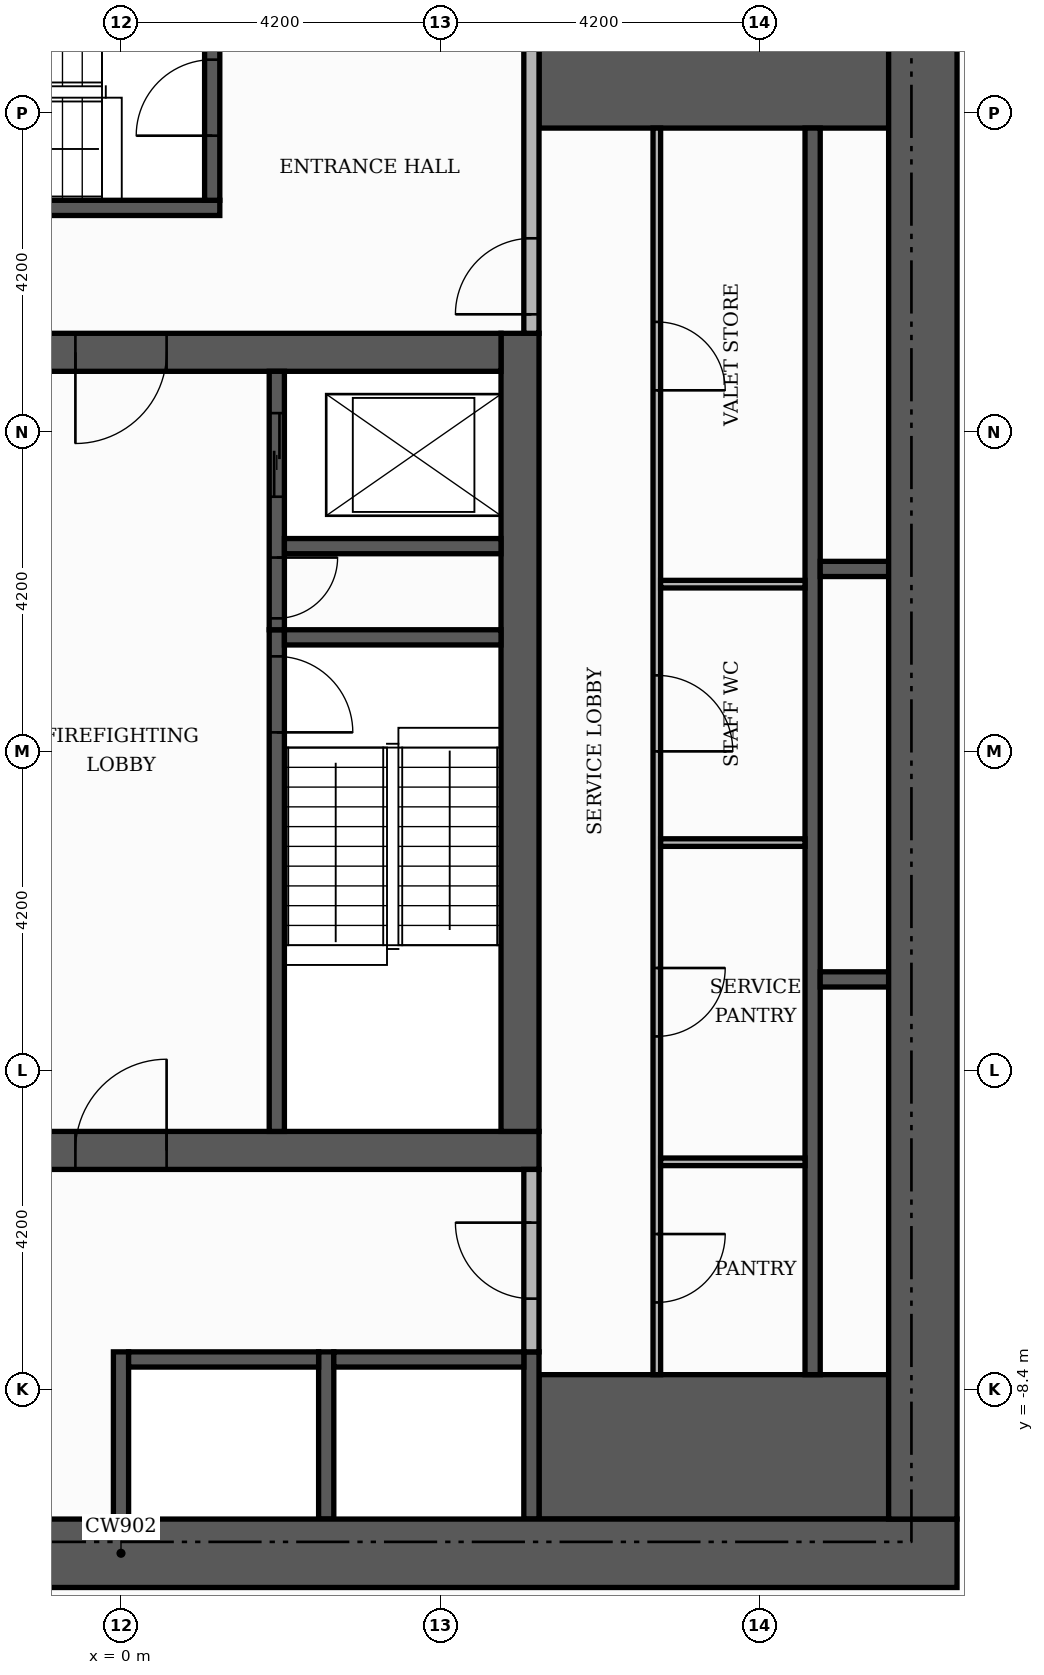
"""IFC4 building model, lengths in metres.
Left out: names, types, materials, properties, quantities, classifications, styles, units other than length and angle.
Written with IfcOpenShell. Run it as: python <this file> out.ifc"""

import sys

from ifc_helpers import new_model, si_unit, direction, frame, frame_2d, origin, place, context, subcontext, project, spatial, rectangle, extrude, element, fill, save


model = new_model("IFC4")
c1 = context("Model", 3, precision=1e-05, world=origin(), true_north=direction((0.0, 1.0)))
c2 = subcontext(c1, "Body", "Model", "MODEL_VIEW")
j1 = project(units=[si_unit("LENGTHUNIT", "METRE"), si_unit("PLANEANGLEUNIT", "RADIAN")], contexts=[c1])
p1 = place(None, origin())
s1 = spatial("IfcSite", under=j1, at=p1, CompositionType="ELEMENT")
p2 = place(p1, origin())
s2 = spatial("IfcBuilding", under=s1, at=p2, CompositionType="ELEMENT")
p3 = place(p2, frame((0.0, 0.0, 98.7)))
s3 = spatial("IfcBuildingStorey", under=s2, at=p3, CompositionType="ELEMENT", Elevation=98.7)
p4 = place(p3, frame((-5.5, -5.25, 0.0), z_axis=(0.0, 0.0, 1.0), x_axis=(1.0, 0.0, 0.0)))
e1 = element("IfcWall", 1, at=p4, inside=s3, PredefinedType="SHEAR", context=c2, shape_type="SweptSolid", body=[
    extrude(rectangle(XDim=11.0, YDim=0.5, at=frame_2d((5.5, 0.0))), origin(), (0.0, 0.0, 1.0), 3.48),
])
p5 = place(p4, frame((4.9, 0.0, 0.0)))
e2 = element("IfcOpeningElement", 2, at=p5, cuts=e1, PredefinedType="OPENING", context=c2, shape_type="SweptSolid", body=[
    extrude(rectangle(XDim=1.2, YDim=2.1, at=frame_2d((0.6, 1.05))), frame((0.0, 0.26, 0.0), z_axis=(0.0, -1.0, 0.0), x_axis=(1.0, 0.0, 0.0)), (0.0, 0.0, 1.0), 0.52),
])
p6 = place(p3, frame((5.25, -5.0, 0.0), z_axis=(0.0, 0.0, 1.0), x_axis=(0.0, 1.0, 0.0)))
e3 = element("IfcWall", 3, at=p6, inside=s3, PredefinedType="SHEAR", context=c2, shape_type="SweptSolid", body=[
    extrude(rectangle(XDim=10.5, YDim=0.5, at=frame_2d((5.25, 0.0))), origin(), (0.0, 0.0, 1.0), 3.48),
])
p7 = place(p3, frame((-5.0, 5.25, 0.0), z_axis=(0.0, 0.0, 1.0), x_axis=(1.0, 0.0, 0.0)))
e4 = element("IfcWall", 4, at=p7, inside=s3, PredefinedType="SHEAR", context=c2, shape_type="SweptSolid", body=[
    extrude(rectangle(XDim=10.0, YDim=0.5, at=frame_2d((5.0, 0.0))), origin(), (0.0, 0.0, 1.0), 3.48),
])
p8 = place(p7, frame((4.4, 0.0, 0.0)))
e5 = element("IfcOpeningElement", 5, at=p8, cuts=e4, PredefinedType="OPENING", context=c2, shape_type="SweptSolid", body=[
    extrude(rectangle(XDim=1.2, YDim=2.1, at=frame_2d((0.6, 1.05))), frame((0.0, 0.26, 0.0), z_axis=(0.0, -1.0, 0.0), x_axis=(1.0, 0.0, 0.0)), (0.0, 0.0, 1.0), 0.52),
])
for number, where, z_axis, x_axis in (
    (6, (5.5, -9.15, 0.0), (0.0, 0.0, 1.0), (1.0, 0.0, 0.0)),
    (7, (5.5, 9.15, 0.0), (0.0, 0.0, 1.0), (1.0, 0.0, 0.0)),
):
    element("IfcWall", number, at=place(p3, frame(where, z_axis=z_axis, x_axis=x_axis)), inside=s3, PredefinedType="SHEAR", context=c2, shape_type="SweptSolid", body=[
        extrude(rectangle(XDim=4.6, YDim=1.9, at=frame_2d((2.3, 0.0))), origin(), (0.0, 0.0, 1.0), 3.48),
    ])
p9 = place(p3, frame((2.05, -5.0, 0.0), z_axis=(0.0, 0.0, 1.0), x_axis=(0.0, 1.0, 0.0)))
e8 = element("IfcWall", 8, at=p9, inside=s3, PredefinedType="SHEAR", context=c2, shape_type="SweptSolid", body=[
    extrude(rectangle(XDim=6.6, YDim=0.2, at=frame_2d((3.3, 0.0))), origin(), (0.0, 0.0, 1.0), 3.48),
])
p10 = place(p9, frame((5.25, 0.0, 0.0)))
e9 = element("IfcOpeningElement", 9, at=p10, cuts=e8, PredefinedType="OPENING", context=c2, shape_type="SweptSolid", body=[
    extrude(rectangle(XDim=1.0, YDim=2.1, at=frame_2d((0.5, 1.05))), frame((0.0, 0.11, 0.0), z_axis=(0.0, -1.0, 0.0), x_axis=(1.0, 0.0, 0.0)), (0.0, 0.0, 1.0), 0.22),
])
p11 = place(p3, frame((2.15, 1.5, 0.0), z_axis=(0.0, 0.0, 1.0), x_axis=(1.0, 0.0, 0.0)))
e10 = element("IfcWall", 10, at=p11, inside=s3, PredefinedType="SHEAR", context=c2, shape_type="SweptSolid", body=[
    extrude(rectangle(XDim=2.85, YDim=0.2, at=frame_2d((1.425, 0.0))), origin(), (0.0, 0.0, 1.0), 3.48),
])
p12 = place(p3, frame((-5.5, 7.15, 0.0), z_axis=(0.0, 0.0, 1.0), x_axis=(1.0, 0.0, 0.0)))
e11 = element("IfcWall", 11, at=p12, inside=s3, PredefinedType="SHEAR", context=c2, shape_type="SweptSolid", body=[
    extrude(rectangle(XDim=6.8, YDim=0.2, at=frame_2d((3.4, 0.0))), origin(), (0.0, 0.0, 1.0), 3.48),
])
p13 = place(p3, frame((1.2, 7.25, 0.0), z_axis=(0.0, 0.0, 1.0), x_axis=(0.0, 1.0, 0.0)))
e12 = element("IfcWall", 12, at=p13, inside=s3, PredefinedType="SHEAR", context=c2, shape_type="SweptSolid", body=[
    extrude(rectangle(XDim=2.85, YDim=0.2, at=frame_2d((1.425, 0.0))), origin(), (0.0, 0.0, 1.0), 3.48),
])
p14 = place(p13, frame((0.85, 0.0, 0.0)))
e13 = element("IfcOpeningElement", 13, at=p14, cuts=e12, PredefinedType="OPENING", context=c2, shape_type="SweptSolid", body=[
    extrude(rectangle(XDim=1.0, YDim=2.1, at=frame_2d((0.5, 1.05))), frame((0.0, 0.11, 0.0), z_axis=(0.0, -1.0, 0.0), x_axis=(1.0, 0.0, 0.0)), (0.0, 0.0, 1.0), 0.22),
])
for number, where, z_axis, x_axis in (
    (14, (0.0, -10.1, 0.0), (0.0, 0.0, 1.0), (0.0, 1.0, 0.0)),
    (15, (2.7, -10.1, 0.0), (0.0, 0.0, 1.0), (0.0, 1.0, 0.0)),
    (16, (5.4, -10.1, 0.0), (0.0, 0.0, 1.0), (0.0, 1.0, 0.0)),
):
    element("IfcWall", number, at=place(p3, frame(where, z_axis=z_axis, x_axis=x_axis)), inside=s3, PredefinedType="SHEAR", context=c2, shape_type="SweptSolid", body=[
        extrude(rectangle(XDim=2.2, YDim=0.2, at=frame_2d((1.1, 0.0))), origin(), (0.0, 0.0, 1.0), 3.48),
    ])
p15 = place(p3, frame((9.1, -8.2, 0.0), z_axis=(0.0, 0.0, 1.0), x_axis=(0.0, 1.0, 0.0)))
e17 = element("IfcWall", 17, at=p15, inside=s3, PredefinedType="SHEAR", context=c2, shape_type="SweptSolid", body=[
    extrude(rectangle(XDim=16.4, YDim=0.2, at=frame_2d((8.2, 0.0))), origin(), (0.0, 0.0, 1.0), 3.48),
])
for number, where, z_axis, x_axis in (
    (18, (0.1, -8.0, 0.0), (0.0, 0.0, 1.0), (1.0, 0.0, 0.0)),
    (19, (2.8, -8.0, 0.0), (0.0, 0.0, 1.0), (1.0, 0.0, 0.0)),
):
    element("IfcWall", number, at=place(p3, frame(where, z_axis=z_axis, x_axis=x_axis)), inside=s3, PredefinedType="SHEAR", context=c2, shape_type="SweptSolid", body=[
        extrude(rectangle(XDim=2.5, YDim=0.2, at=frame_2d((1.25, 0.0))), origin(), (0.0, 0.0, 1.0), 3.48),
    ])
p16 = place(p3, frame((9.2, -3.0, 0.0), z_axis=(0.0, 0.0, 1.0), x_axis=(1.0, 0.0, 0.0)))
e20 = element("IfcWall", 20, at=p16, inside=s3, PredefinedType="SHEAR", context=c2, shape_type="SweptSolid", body=[
    extrude(rectangle(XDim=0.9, YDim=0.2, at=frame_2d((0.45, 0.0))), origin(), (0.0, 0.0, 1.0), 3.48),
])
p17 = place(p3, frame((2.05, 1.6, 0.0), z_axis=(0.0, 0.0, 1.0), x_axis=(0.0, 1.0, 0.0)))
e21 = element("IfcWall", 21, at=p17, inside=s3, PredefinedType="SHEAR", context=c2, shape_type="SweptSolid", body=[
    extrude(rectangle(XDim=3.4, YDim=0.2, at=frame_2d((1.7, 0.0))), origin(), (0.0, 0.0, 1.0), 3.48),
])
p18 = place(p17, frame((1.75, 0.0, 0.0)))
e22 = element("IfcOpeningElement", 22, at=p18, cuts=e21, PredefinedType="OPENING", context=c2, shape_type="SweptSolid", body=[
    extrude(rectangle(XDim=1.1, YDim=2.1, at=frame_2d((0.55, 1.05))), frame((0.0, 0.11, 0.0), z_axis=(0.0, -1.0, 0.0), x_axis=(1.0, 0.0, 0.0)), (0.0, 0.0, 1.0), 0.22),
])
p19 = place(p17, frame((0.15, 0.0, 0.0)))
e23 = element("IfcOpeningElement", 23, at=p19, cuts=e21, PredefinedType="OPENING", context=c2, shape_type="SweptSolid", body=[
    extrude(rectangle(XDim=0.8, YDim=2.1, at=frame_2d((0.4, 1.05))), frame((0.0, 0.11, 0.0), z_axis=(0.0, -1.0, 0.0), x_axis=(1.0, 0.0, 0.0)), (0.0, 0.0, 1.0), 0.22),
])
p20 = place(p3, frame((9.2, 2.4, 0.0), z_axis=(0.0, 0.0, 1.0), x_axis=(1.0, 0.0, 0.0)))
e24 = element("IfcWall", 24, at=p20, inside=s3, PredefinedType="SHEAR", context=c2, shape_type="SweptSolid", body=[
    extrude(rectangle(XDim=0.9, YDim=0.2, at=frame_2d((0.45, 0.0))), origin(), (0.0, 0.0, 1.0), 3.48),
])
p21 = place(p3, frame((2.15, 2.7, 0.0), z_axis=(0.0, 0.0, 1.0), x_axis=(1.0, 0.0, 0.0)))
e25 = element("IfcWall", 25, at=p21, inside=s3, PredefinedType="SHEAR", context=c2, shape_type="SweptSolid", body=[
    extrude(rectangle(XDim=2.85, YDim=0.2, at=frame_2d((1.425, 0.0))), origin(), (0.0, 0.0, 1.0), 3.48),
])
p22 = place(p3, frame((-11.0, -10.55, 0.0), z_axis=(0.0, 0.0, 1.0), x_axis=(1.0, 0.0, 0.0)))
e26 = element("IfcWall", 26, at=p22, inside=s3, PredefinedType="SHEAR", context=c2, shape_type="SweptSolid", body=[
    extrude(rectangle(XDim=22.0, YDim=0.9, at=frame_2d((11.0, 0.0))), origin(), (0.0, 0.0, 1.0), 3.48),
])
p23 = place(p22, frame((7.4, 0.0, 0.0)))
e27 = element("IfcOpeningElement", 27, at=p23, cuts=e26, PredefinedType="OPENING", context=c2, shape_type="SweptSolid", body=[
    extrude(rectangle(XDim=1.8, YDim=2.2, at=frame_2d((0.9, 1.1))), frame((0.0, 0.46, 0.0), z_axis=(0.0, -1.0, 0.0), x_axis=(1.0, 0.0, 0.0)), (0.0, 0.0, 1.0), 0.92),
])
p24 = place(p3, frame((10.55, -10.1, 0.0), z_axis=(0.0, 0.0, 1.0), x_axis=(0.0, 1.0, 0.0)))
e28 = element("IfcWall", 28, at=p24, inside=s3, PredefinedType="SHEAR", context=c2, shape_type="SweptSolid", body=[
    extrude(rectangle(XDim=20.2, YDim=0.9, at=frame_2d((10.1, 0.0))), origin(), (0.0, 0.0, 1.0), 3.48),
])
p25 = place(p3, frame((7.05, -8.2, 0.0), z_axis=(0.0, 0.0, 1.0), x_axis=(0.0, 1.0, 0.0)))
e29 = element("IfcWall", 29, at=p25, inside=s3, PredefinedType="PARTITIONING", context=c2, shape_type="SweptSolid", body=[
    extrude(rectangle(XDim=16.4, YDim=0.1, at=frame_2d((8.2, 0.0))), origin(), (0.0, 0.0, 1.0), 3.48),
])
p26 = place(p25, frame((0.95, 0.0, 0.0)))
e30 = element("IfcOpeningElement", 30, at=p26, cuts=e29, PredefinedType="OPENING", context=c2, shape_type="SweptSolid", body=[
    extrude(rectangle(XDim=0.9, YDim=2.1, at=frame_2d((0.45, 1.05))), frame((0.0, 0.06, 0.0), z_axis=(0.0, -1.0, 0.0), x_axis=(1.0, 0.0, 0.0)), (0.0, 0.0, 1.0), 0.12),
])
p27 = place(p25, frame((4.45, 0.0, 0.0)))
e31 = element("IfcOpeningElement", 31, at=p27, cuts=e29, PredefinedType="OPENING", context=c2, shape_type="SweptSolid", body=[
    extrude(rectangle(XDim=0.9, YDim=2.1, at=frame_2d((0.45, 1.05))), frame((0.0, 0.06, 0.0), z_axis=(0.0, -1.0, 0.0), x_axis=(1.0, 0.0, 0.0)), (0.0, 0.0, 1.0), 0.12),
])
p28 = place(p25, frame((8.2, 0.0, 0.0)))
e32 = element("IfcOpeningElement", 32, at=p28, cuts=e29, PredefinedType="OPENING", context=c2, shape_type="SweptSolid", body=[
    extrude(rectangle(XDim=1.0, YDim=2.1, at=frame_2d((0.5, 1.05))), frame((0.0, 0.06, 0.0), z_axis=(0.0, -1.0, 0.0), x_axis=(1.0, 0.0, 0.0)), (0.0, 0.0, 1.0), 0.12),
])
p29 = place(p25, frame((12.95, 0.0, 0.0)))
e33 = element("IfcOpeningElement", 33, at=p29, cuts=e29, PredefinedType="OPENING", context=c2, shape_type="SweptSolid", body=[
    extrude(rectangle(XDim=0.9, YDim=2.1, at=frame_2d((0.45, 1.05))), frame((0.0, 0.06, 0.0), z_axis=(0.0, -1.0, 0.0), x_axis=(1.0, 0.0, 0.0)), (0.0, 0.0, 1.0), 0.12),
])
p30 = place(p3, frame((5.4, -7.9, 0.0), z_axis=(0.0, 0.0, 1.0), x_axis=(0.0, 1.0, 0.0)))
e34 = element("IfcWall", 34, at=p30, inside=s3, PredefinedType="PARTITIONING", context=c2, shape_type="SweptSolid", body=[
    extrude(rectangle(XDim=2.4, YDim=0.2, at=frame_2d((1.2, 0.0))), origin(), (0.0, 0.0, 1.0), 3.48),
])
p31 = place(p30, frame((0.7, 0.0, 0.0)))
e35 = element("IfcOpeningElement", 35, at=p31, cuts=e34, PredefinedType="OPENING", context=c2, shape_type="SweptSolid", body=[
    extrude(rectangle(XDim=1.0, YDim=2.1, at=frame_2d((0.5, 1.05))), frame((0.0, 0.11, 0.0), z_axis=(0.0, -1.0, 0.0), x_axis=(1.0, 0.0, 0.0)), (0.0, 0.0, 1.0), 0.22),
])
for number, where, z_axis, x_axis in (
    (36, (7.1, -5.4, 0.0), (0.0, 0.0, 1.0), (1.0, 0.0, 0.0)),
    (37, (7.1, -1.2, 0.0), (0.0, 0.0, 1.0), (1.0, 0.0, 0.0)),
    (38, (7.1, 2.2, 0.0), (0.0, 0.0, 1.0), (1.0, 0.0, 0.0)),
):
    element("IfcWall", number, at=place(p3, frame(where, z_axis=z_axis, x_axis=x_axis)), inside=s3, PredefinedType="PARTITIONING", context=c2, shape_type="SweptSolid", body=[
        extrude(rectangle(XDim=1.9, YDim=0.1, at=frame_2d((0.95, 0.0))), origin(), (0.0, 0.0, 1.0), 3.48),
    ])
p32 = place(p3, frame((5.4, 5.5, 0.0), z_axis=(0.0, 0.0, 1.0), x_axis=(0.0, 1.0, 0.0)))
e39 = element("IfcWall", 39, at=p32, inside=s3, PredefinedType="PARTITIONING", context=c2, shape_type="SweptSolid", body=[
    extrude(rectangle(XDim=4.6, YDim=0.2, at=frame_2d((2.3, 0.0))), origin(), (0.0, 0.0, 1.0), 3.48),
])
p33 = place(p32, frame((0.25, 0.0, 0.0)))
e40 = element("IfcOpeningElement", 40, at=p33, cuts=e39, PredefinedType="OPENING", context=c2, shape_type="SweptSolid", body=[
    extrude(rectangle(XDim=1.0, YDim=2.1, at=frame_2d((0.5, 1.05))), frame((0.0, 0.11, 0.0), z_axis=(0.0, -1.0, 0.0), x_axis=(1.0, 0.0, 0.0)), (0.0, 0.0, 1.0), 0.22),
])
p34 = place(p18, origin())
e41 = element("IfcDoor", 41, at=p34, inside=s3, OperationType="SLIDING_TO_LEFT", PredefinedType="DOOR", context=c2, shape_type="SweptSolid", body=[
    extrude(rectangle(XDim=1.1, YDim=2.1, at=frame_2d((0.55, 1.05))), frame((0.0, 0.025, 0.0), z_axis=(0.0, -1.0, 0.0), x_axis=(1.0, 0.0, 0.0)), (0.0, 0.0, 1.0), 0.05),
])
fill(e22, e41)
p35 = place(p10, frame((1.0, 0.0, 0.0), z_axis=(0.0, 0.0, 1.0), x_axis=(-1.0, 0.0, 0.0)))
e42 = element("IfcDoor", 42, at=p35, inside=s3, OperationType="SINGLE_SWING_LEFT", PredefinedType="DOOR", context=c2, shape_type="SweptSolid", body=[
    extrude(rectangle(XDim=1.0, YDim=2.1, at=frame_2d((0.5, 1.05))), frame((0.0, 0.025, 0.0), z_axis=(0.0, -1.0, 0.0), x_axis=(1.0, 0.0, 0.0)), (0.0, 0.0, 1.0), 0.05),
])
fill(e9, e42)
p36 = place(p19, frame((0.8, 0.0, 0.0), z_axis=(0.0, 0.0, 1.0), x_axis=(-1.0, 0.0, 0.0)))
e43 = element("IfcDoor", 43, at=p36, inside=s3, OperationType="SINGLE_SWING_RIGHT", PredefinedType="DOOR", context=c2, shape_type="SweptSolid", body=[
    extrude(rectangle(XDim=0.8, YDim=2.1, at=frame_2d((0.4, 1.05))), frame((0.0, 0.025, 0.0), z_axis=(0.0, -1.0, 0.0), x_axis=(1.0, 0.0, 0.0)), (0.0, 0.0, 1.0), 0.05),
])
fill(e23, e43)
p37 = place(p8, frame((1.2, 0.0, 0.0), z_axis=(0.0, 0.0, 1.0), x_axis=(-1.0, 0.0, 0.0)))
e44 = element("IfcDoor", 44, at=p37, inside=s3, OperationType="SINGLE_SWING_LEFT", PredefinedType="DOOR", context=c2, shape_type="SweptSolid", body=[
    extrude(rectangle(XDim=1.2, YDim=2.1, at=frame_2d((0.6, 1.05))), frame((0.0, 0.025, 0.0), z_axis=(0.0, -1.0, 0.0), x_axis=(1.0, 0.0, 0.0)), (0.0, 0.0, 1.0), 0.05),
])
fill(e5, e44)
p38 = place(p5, origin())
e45 = element("IfcDoor", 45, at=p38, inside=s3, OperationType="SINGLE_SWING_RIGHT", PredefinedType="DOOR", context=c2, shape_type="SweptSolid", body=[
    extrude(rectangle(XDim=1.2, YDim=2.1, at=frame_2d((0.6, 1.05))), frame((0.0, 0.025, 0.0), z_axis=(0.0, -1.0, 0.0), x_axis=(1.0, 0.0, 0.0)), (0.0, 0.0, 1.0), 0.05),
])
fill(e2, e45)
p39 = place(p14, origin())
e46 = element("IfcDoor", 46, at=p39, inside=s3, OperationType="SINGLE_SWING_LEFT", PredefinedType="DOOR", context=c2, shape_type="SweptSolid", body=[
    extrude(rectangle(XDim=1.0, YDim=2.1, at=frame_2d((0.5, 1.05))), frame((0.0, 0.025, 0.0), z_axis=(0.0, -1.0, 0.0), x_axis=(1.0, 0.0, 0.0)), (0.0, 0.0, 1.0), 0.05),
])
fill(e13, e46)
p40 = place(p33, origin())
e47 = element("IfcDoor", 47, at=p40, inside=s3, OperationType="SINGLE_SWING_LEFT", PredefinedType="DOOR", context=c2, shape_type="SweptSolid", body=[
    extrude(rectangle(XDim=1.0, YDim=2.1, at=frame_2d((0.5, 1.05))), frame((0.0, 0.025, 0.0), z_axis=(0.0, -1.0, 0.0), x_axis=(1.0, 0.0, 0.0)), (0.0, 0.0, 1.0), 0.05),
])
fill(e40, e47)
p41 = place(p31, origin())
e48 = element("IfcDoor", 48, at=p41, inside=s3, OperationType="SINGLE_SWING_RIGHT", PredefinedType="DOOR", context=c2, shape_type="SweptSolid", body=[
    extrude(rectangle(XDim=1.0, YDim=2.1, at=frame_2d((0.5, 1.05))), frame((0.0, 0.025, 0.0), z_axis=(0.0, -1.0, 0.0), x_axis=(1.0, 0.0, 0.0)), (0.0, 0.0, 1.0), 0.05),
])
fill(e35, e48)
p42 = place(p26, frame((0.9, 0.0, 0.0), z_axis=(0.0, 0.0, 1.0), x_axis=(-1.0, 0.0, 0.0)))
e49 = element("IfcDoor", 49, at=p42, inside=s3, OperationType="SINGLE_SWING_RIGHT", PredefinedType="DOOR", context=c2, shape_type="SweptSolid", body=[
    extrude(rectangle(XDim=0.9, YDim=2.1, at=frame_2d((0.45, 1.05))), frame((0.0, 0.025, 0.0), z_axis=(0.0, -1.0, 0.0), x_axis=(1.0, 0.0, 0.0)), (0.0, 0.0, 1.0), 0.05),
])
fill(e30, e49)
p43 = place(p27, frame((0.9, 0.0, 0.0), z_axis=(0.0, 0.0, 1.0), x_axis=(-1.0, 0.0, 0.0)))
e50 = element("IfcDoor", 50, at=p43, inside=s3, OperationType="SINGLE_SWING_RIGHT", PredefinedType="DOOR", context=c2, shape_type="SweptSolid", body=[
    extrude(rectangle(XDim=0.9, YDim=2.1, at=frame_2d((0.45, 1.05))), frame((0.0, 0.025, 0.0), z_axis=(0.0, -1.0, 0.0), x_axis=(1.0, 0.0, 0.0)), (0.0, 0.0, 1.0), 0.05),
])
fill(e31, e50)
p44 = place(p28, frame((1.0, 0.0, 0.0), z_axis=(0.0, 0.0, 1.0), x_axis=(-1.0, 0.0, 0.0)))
e51 = element("IfcDoor", 51, at=p44, inside=s3, OperationType="SINGLE_SWING_LEFT", PredefinedType="DOOR", context=c2, shape_type="SweptSolid", body=[
    extrude(rectangle(XDim=1.0, YDim=2.1, at=frame_2d((0.5, 1.05))), frame((0.0, 0.025, 0.0), z_axis=(0.0, -1.0, 0.0), x_axis=(1.0, 0.0, 0.0)), (0.0, 0.0, 1.0), 0.05),
])
fill(e32, e51)
p45 = place(p29, frame((0.9, 0.0, 0.0), z_axis=(0.0, 0.0, 1.0), x_axis=(-1.0, 0.0, 0.0)))
e52 = element("IfcDoor", 52, at=p45, inside=s3, OperationType="SINGLE_SWING_LEFT", PredefinedType="DOOR", context=c2, shape_type="SweptSolid", body=[
    extrude(rectangle(XDim=0.9, YDim=2.1, at=frame_2d((0.45, 1.05))), frame((0.0, 0.025, 0.0), z_axis=(0.0, -1.0, 0.0), x_axis=(1.0, 0.0, 0.0)), (0.0, 0.0, 1.0), 0.05),
])
fill(e33, e52)
save(model, sys.argv[1])
